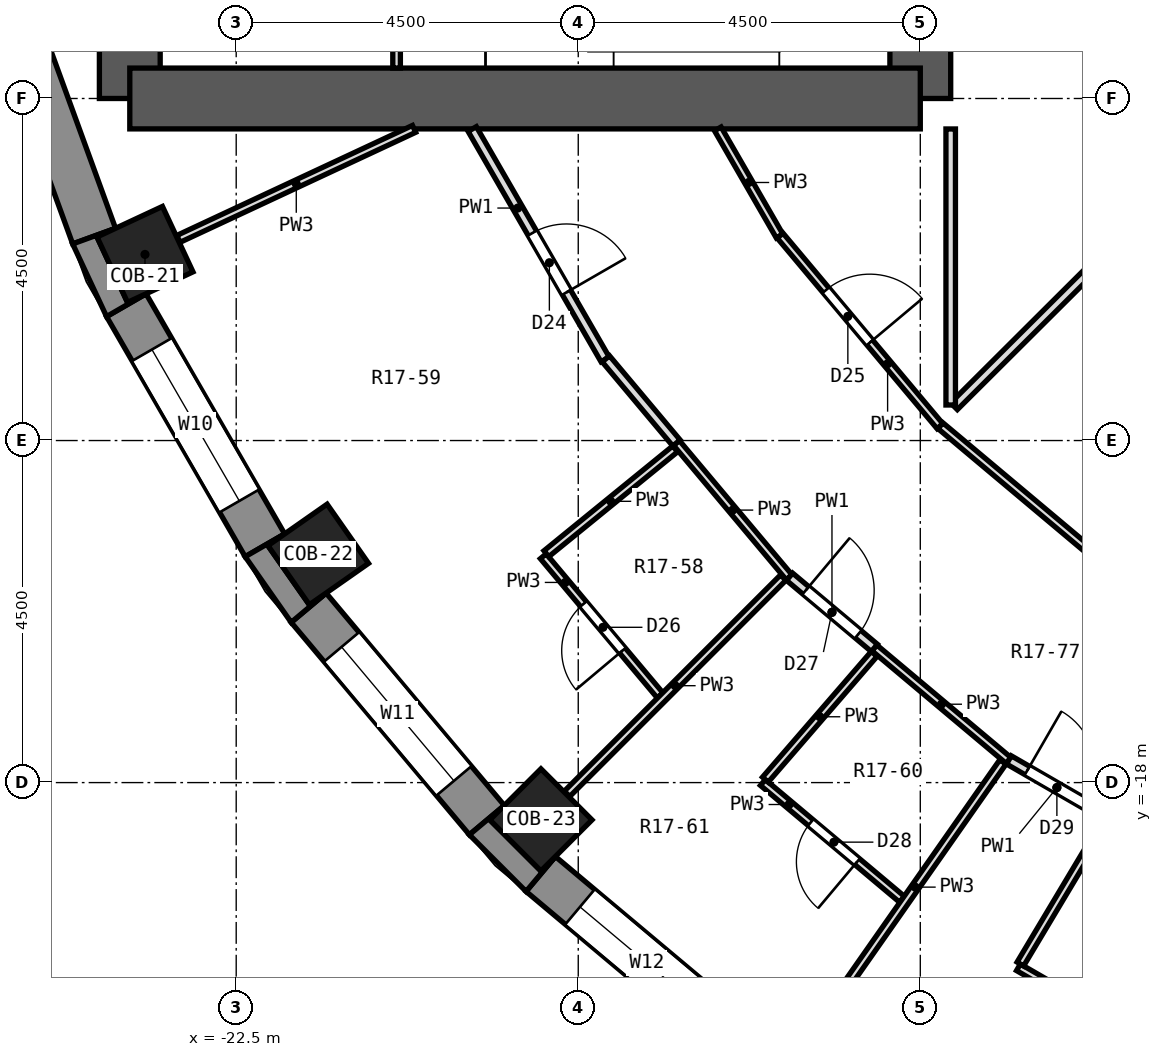
"""IFC4 building model, lengths in metres.
Left out: names, types, materials, properties, quantities, classifications, styles, units other than length and angle.
Written with IfcOpenShell. Run it as: python <this file> out.ifc"""

import sys

from ifc_helpers import new_model, si_unit, direction, frame, frame_2d, origin, origin_2d, place, context, subcontext, project, spatial, polyline, rectangle, outline, extrude, element, fill, save


model = new_model("IFC4")
c1 = context("Model", 3, precision=1e-05, world=origin(), true_north=direction((0.0, 1.0)))
c2 = subcontext(c1, "Body", "Model", "MODEL_VIEW")
j1 = project(units=[si_unit("LENGTHUNIT", "METRE"), si_unit("PLANEANGLEUNIT", "RADIAN")], contexts=[c1])
p1 = place(None, origin())
s1 = spatial("IfcSite", under=j1, at=p1, CompositionType="ELEMENT")
p2 = place(p1, origin())
s2 = spatial("IfcBuilding", under=s1, at=p2, CompositionType="ELEMENT")
p3 = place(p2, frame((0.0, 0.0, 91.9)))
s3 = spatial("IfcBuildingStorey", under=s2, at=p3, CompositionType="ELEMENT", Elevation=91.9)
for number, where, z_axis, x_axis in (
    (1, (-23.7, -11.052, 0.0), (0.0, 0.0, 1.0), (-0.906, -0.423, 0.0)),
    (2, (-21.421, -14.999, 0.0), (0.0, 0.0, 1.0), (-0.819, -0.574, 0.0)),
    (3, (-18.491, -18.491, 0.0), (0.0, 0.0, 1.0), (-0.707, -0.707, 0.0)),
):
    element("IfcColumn", number, at=place(p3, frame(where, z_axis=z_axis, x_axis=x_axis)), inside=s3, PredefinedType="COLUMN", context=c2, shape_type="SweptSolid", body=[
        extrude(rectangle(XDim=0.95, YDim=0.95, at=origin_2d()), origin(), (0.0, 0.0, 1.0), 3.3),
    ])
p4 = place(p3, frame((-13.5, -9.0, 0.0), z_axis=(0.0, 0.0, 1.0), x_axis=(0.0, 1.0, 0.0)))
e4 = element("IfcWall", 4, at=p4, inside=s3, PredefinedType="SHEAR", context=c2, shape_type="SweptSolid", body=[
    extrude(rectangle(XDim=18.0, YDim=0.8, at=frame_2d((9.0, 0.0))), origin(), (0.0, 0.0, 1.0), 3.3),
])
p5 = place(p4, frame((15.4, 0.0, 0.0)))
e5 = element("IfcOpeningElement", 5, at=p5, cuts=e4, PredefinedType="OPENING", context=c2, shape_type="SweptSolid", body=[
    extrude(rectangle(XDim=1.2, YDim=2.1, at=frame_2d((0.6, 1.05))), frame((0.0, 0.412, 0.0), z_axis=(0.0, -1.0, 0.0), x_axis=(1.0, 0.0, 0.0)), (0.0, 0.0, 1.0), 0.824),
])
p6 = place(p4, frame((1.4, 0.0, 0.0)))
e6 = element("IfcOpeningElement", 6, at=p6, cuts=e4, PredefinedType="OPENING", context=c2, shape_type="SweptSolid", body=[
    extrude(rectangle(XDim=1.2, YDim=2.1, at=frame_2d((0.6, 1.05))), frame((0.0, 0.412, 0.0), z_axis=(0.0, -1.0, 0.0), x_axis=(1.0, 0.0, 0.0)), (0.0, 0.0, 1.0), 0.824),
])
p7 = place(p4, frame((7.5, 0.0, 0.0)))
e7 = element("IfcOpeningElement", 7, at=p7, cuts=e4, PredefinedType="OPENING", context=c2, shape_type="SweptSolid", body=[
    extrude(rectangle(XDim=3.0, YDim=2.4, at=frame_2d((1.5, 1.2))), frame((0.0, 0.412, 0.0), z_axis=(0.0, -1.0, 0.0), x_axis=(1.0, 0.0, 0.0)), (0.0, 0.0, 1.0), 0.824),
])
p8 = place(p3, frame((-23.9, -9.0, 0.0), z_axis=(0.0, 0.0, 1.0), x_axis=(0.0, 1.0, 0.0)))
e8 = element("IfcWall", 8, at=p8, inside=s3, PredefinedType="SHEAR", context=c2, shape_type="SweptSolid", body=[
    extrude(rectangle(XDim=18.0, YDim=0.8, at=frame_2d((9.0, 0.0))), origin(), (0.0, 0.0, 1.0), 3.3),
])
p9 = place(p3, frame((-13.5, -9.0, 0.0), z_axis=(0.0, 0.0, 1.0), x_axis=(-1.0, 0.0, 0.0)))
e9 = element("IfcWall", 9, at=p9, inside=s3, PredefinedType="SHEAR", context=c2, shape_type="SweptSolid", body=[
    extrude(rectangle(XDim=10.4, YDim=0.8, at=frame_2d((5.2, 0.0))), origin(), (0.0, 0.0, 1.0), 3.3),
])
p10 = place(p3, frame((-25.617, -7.383, 0.0), z_axis=(0.0, 0.0, 1.0), x_axis=(0.341990236633, -0.939703505393, 0.0)))
e10 = element("IfcWall", 10, at=p10, inside=s3, PredefinedType="SOLIDWALL", context=c2, shape_type="SweptSolid", body=[
    extrude(rectangle(XDim=3.648, YDim=0.6, at=frame_2d((1.824, 0.0))), origin(), (0.0, 0.0, 1.0), 2.8),
])
p11 = place(p3, frame((-23.946, -11.719, 0.0), z_axis=(0.0, 0.0, 1.0), x_axis=(0.499954196102, -0.866051847062, 0.0)))
e11 = element("IfcWall", 11, at=p11, inside=s3, PredefinedType="SOLIDWALL", context=c2, shape_type="SweptSolid", body=[
    extrude(rectangle(XDim=3.648, YDim=0.6, at=frame_2d((1.824, 0.0))), origin(), (0.0, 0.0, 1.0), 2.8),
])
p12 = place(p11, frame((0.674, 0.0, 0.9)))
e12 = element("IfcOpeningElement", 12, at=p12, cuts=e11, PredefinedType="OPENING", context=c2, shape_type="SweptSolid", body=[
    extrude(rectangle(XDim=2.3, YDim=1.8, at=frame_2d((1.15, 0.9))), frame((0.0, 0.312, 0.0), z_axis=(0.0, -1.0, 0.0), x_axis=(1.0, 0.0, 0.0)), (0.0, 0.0, 1.0), 0.624),
])
p13 = place(p3, frame((-21.547, -15.699, 0.0), z_axis=(0.0, 0.0, 1.0), x_axis=(0.642774476932, -0.766055462616, 0.0)))
e13 = element("IfcWall", 13, at=p13, inside=s3, PredefinedType="SOLIDWALL", context=c2, shape_type="SweptSolid", body=[
    extrude(rectangle(XDim=3.648, YDim=0.6, at=frame_2d((1.824, 0.0))), origin(), (0.0, 0.0, 1.0), 2.8),
])
p14 = place(p13, frame((0.674, 0.0, 0.9)))
e14 = element("IfcOpeningElement", 14, at=p14, cuts=e13, PredefinedType="OPENING", context=c2, shape_type="SweptSolid", body=[
    extrude(rectangle(XDim=2.3, YDim=1.8, at=frame_2d((1.15, 0.9))), frame((0.0, 0.312, 0.0), z_axis=(0.0, -1.0, 0.0), x_axis=(1.0, 0.0, 0.0)), (0.0, 0.0, 1.0), 0.624),
])
p15 = place(p3, frame((-18.494, -19.202, 0.0), z_axis=(0.0, 0.0, 1.0), x_axis=(0.766055462616, -0.642774476932, 0.0)))
e15 = element("IfcWall", 15, at=p15, inside=s3, PredefinedType="SOLIDWALL", context=c2, shape_type="SweptSolid", body=[
    extrude(rectangle(XDim=3.648, YDim=0.6, at=frame_2d((1.824, 0.0))), origin(), (0.0, 0.0, 1.0), 2.8),
])
p16 = place(p15, frame((0.674, 0.0, 0.9)))
e16 = element("IfcOpeningElement", 16, at=p16, cuts=e15, PredefinedType="OPENING", context=c2, shape_type="SweptSolid", body=[
    extrude(rectangle(XDim=2.3, YDim=1.8, at=frame_2d((1.15, 0.9))), frame((0.0, 0.312, 0.0), z_axis=(0.0, -1.0, 0.0), x_axis=(1.0, 0.0, 0.0)), (0.0, 0.0, 1.0), 0.624),
])
p17 = place(p3, origin())
e17 = element("IfcWall", 17, at=p17, inside=s3, PredefinedType="SOLIDWALL", context=c2, shape_type="SweptSolid", body=[
    extrude(outline(polyline([(-24.651, -10.913), (-24.206, -11.869), (-23.686, -11.569), (-23.93, -11.683), (-24.331, -10.822), (-24.087, -10.708), (-24.651, -10.913)])), origin(), (0.0, 0.0, 1.0), 2.8),
])
p18 = place(p3, origin())
e18 = element("IfcWall", 18, at=p18, inside=s3, PredefinedType="SOLIDWALL", context=c2, shape_type="SweptSolid", body=[
    extrude(outline(polyline([(-21.777, -15.892), (-21.317, -15.506), (-21.538, -15.661), (-22.083, -14.882), (-21.862, -14.728), (-22.382, -15.028), (-21.777, -15.892)])), origin(), (0.0, 0.0, 1.0), 2.8),
])
p19 = place(p3, origin())
e19 = element("IfcWall", 19, at=p19, inside=s3, PredefinedType="SOLIDWALL", context=c2, shape_type="SweptSolid", body=[
    extrude(outline(polyline([(-19.432, -18.686), (-18.686, -19.432), (-18.301, -18.972), (-18.491, -19.163), (-19.163, -18.491), (-18.972, -18.301), (-19.432, -18.686)])), origin(), (0.0, 0.0, 1.0), 2.8),
])
p20 = place(p3, frame((-19.395, -9.402, 0.0), z_axis=(0.0, 0.0, 1.0), x_axis=(0.499726480438, -0.866183262797, 0.0)))
e20 = element("IfcWall", 20, at=p20, inside=s3, PredefinedType="PARTITIONING", context=c2, shape_type="SweptSolid", body=[
    extrude(rectangle(XDim=3.499, YDim=0.125, at=frame_2d((1.75, 0.0))), origin(), (0.0, 0.0, 1.0), 2.8),
])
p21 = place(p20, frame((1.581, 0.0, 0.0)))
e21 = element("IfcOpeningElement", 21, at=p21, cuts=e20, PredefinedType="OPENING", context=c2, shape_type="SweptSolid", body=[
    extrude(rectangle(XDim=0.9, YDim=2.1, at=frame_2d((0.45, 1.05))), frame((0.0, 0.074, 0.0), z_axis=(0.0, -1.0, 0.0), x_axis=(1.0, 0.0, 0.0)), (0.0, 0.0, 1.0), 0.149),
])
p22 = place(p3, frame((-16.164, -9.4, 0.0), z_axis=(0.0, 0.0, 1.0), x_axis=(0.499687832671, -0.866205558676, 0.0)))
e22 = element("IfcWall", 22, at=p22, inside=s3, PredefinedType="PARTITIONING", context=c2, shape_type="SweptSolid", body=[
    extrude(rectangle(XDim=1.628, YDim=0.1, at=frame_2d((0.814, 0.0))), origin(), (0.0, 0.0, 1.0), 2.8),
])
p23 = place(p3, frame((-18.46, -15.022, 0.0), z_axis=(0.0, 0.0, 1.0), x_axis=(0.642942941421, -0.765914077477, 0.0)))
e23 = element("IfcWall", 23, at=p23, inside=s3, PredefinedType="PARTITIONING", context=c2, shape_type="SweptSolid", body=[
    extrude(rectangle(XDim=2.39, YDim=0.1, at=frame_2d((1.195, 0.0))), origin(), (0.0, 0.0, 1.0), 2.8),
])
p24 = place(p23, frame((0.821, 0.0, 0.0)))
e24 = element("IfcOpeningElement", 24, at=p24, cuts=e23, PredefinedType="OPENING", context=c2, shape_type="SweptSolid", body=[
    extrude(rectangle(XDim=0.8, YDim=2.1, at=frame_2d((0.4, 1.05))), frame((0.0, 0.062, 0.0), z_axis=(0.0, -1.0, 0.0), x_axis=(1.0, 0.0, 0.0)), (0.0, 0.0, 1.0), 0.124),
])
p25 = place(p3, frame((-16.708, -13.532, 0.0), z_axis=(0.0, 0.0, 1.0), x_axis=(0.642762571273, -0.766065452145, 0.0)))
e25 = element("IfcWall", 25, at=p25, inside=s3, PredefinedType="PARTITIONING", context=c2, shape_type="SweptSolid", body=[
    extrude(rectangle(XDim=2.307, YDim=0.1, at=frame_2d((1.153, 0.0))), origin(), (0.0, 0.0, 1.0), 2.8),
])
p26 = place(p3, frame((-17.637, -12.425, 0.0), z_axis=(0.0, 0.0, 1.0), x_axis=(0.642641061866, -0.766167387458, 0.0)))
e26 = element("IfcWall", 26, at=p26, inside=s3, PredefinedType="PARTITIONING", context=c2, shape_type="SweptSolid", body=[
    extrude(rectangle(XDim=1.445, YDim=0.125, at=frame_2d((0.722, 0.0))), origin(), (0.0, 0.0, 1.0), 2.8),
])
p27 = place(p3, frame((-15.344, -10.804, 0.0), z_axis=(0.0, 0.0, 1.0), x_axis=(0.642602374159, -0.766199836025, 0.0)))
e27 = element("IfcWall", 27, at=p27, inside=s3, PredefinedType="PARTITIONING", context=c2, shape_type="SweptSolid", body=[
    extrude(rectangle(XDim=3.273, YDim=0.1, at=frame_2d((1.636, 0.0))), origin(), (0.0, 0.0, 1.0), 2.8),
])
p28 = place(p27, frame((0.936, 0.0, 0.0)))
e28 = element("IfcOpeningElement", 28, at=p28, cuts=e27, PredefinedType="OPENING", context=c2, shape_type="SweptSolid", body=[
    extrude(rectangle(XDim=0.9, YDim=2.1, at=frame_2d((0.45, 1.05))), frame((0.0, 0.062, 0.0), z_axis=(0.0, -1.0, 0.0), x_axis=(1.0, 0.0, 0.0)), (0.0, 0.0, 1.0), 0.124),
])
p29 = place(p3, frame((-15.571, -17.999, 0.0), z_axis=(0.0, 0.0, 1.0), x_axis=(0.765914077477, -0.642942941421, 0.0)))
e29 = element("IfcWall", 29, at=p29, inside=s3, PredefinedType="PARTITIONING", context=c2, shape_type="SweptSolid", body=[
    extrude(rectangle(XDim=2.39, YDim=0.1, at=frame_2d((1.195, 0.0))), origin(), (0.0, 0.0, 1.0), 2.8),
])
p30 = place(p29, frame((0.82, 0.0, 0.0)))
e30 = element("IfcOpeningElement", 30, at=p30, cuts=e29, PredefinedType="OPENING", context=c2, shape_type="SweptSolid", body=[
    extrude(rectangle(XDim=0.8, YDim=2.1, at=frame_2d((0.4, 1.05))), frame((0.0, 0.062, 0.0), z_axis=(0.0, -1.0, 0.0), x_axis=(1.0, 0.0, 0.0)), (0.0, 0.0, 1.0), 0.124),
])
p31 = place(p3, frame((-14.104, -16.228, 0.0), z_axis=(0.0, 0.0, 1.0), x_axis=(0.76604687987, -0.642784705669, 0.0)))
e31 = element("IfcWall", 31, at=p31, inside=s3, PredefinedType="PARTITIONING", context=c2, shape_type="SweptSolid", body=[
    extrude(rectangle(XDim=2.305, YDim=0.1, at=frame_2d((1.153, 0.0))), origin(), (0.0, 0.0, 1.0), 2.8),
])
p32 = place(p3, frame((-15.22, -15.292, 0.0), z_axis=(0.0, 0.0, 1.0), x_axis=(0.766114305984, -0.642704341177, 0.0)))
e32 = element("IfcWall", 32, at=p32, inside=s3, PredefinedType="PARTITIONING", context=c2, shape_type="SweptSolid", body=[
    extrude(rectangle(XDim=1.456, YDim=0.125, at=frame_2d((0.728, 0.0))), origin(), (0.0, 0.0, 1.0), 2.8),
])
p33 = place(p32, frame((0.278, 0.0, 0.0)))
e33 = element("IfcOpeningElement", 33, at=p33, cuts=e32, PredefinedType="OPENING", context=c2, shape_type="SweptSolid", body=[
    extrude(rectangle(XDim=0.9, YDim=2.1, at=frame_2d((0.45, 1.05))), frame((0.0, 0.074, 0.0), z_axis=(0.0, -1.0, 0.0), x_axis=(1.0, 0.0, 0.0)), (0.0, 0.0, 1.0), 0.149),
])
p34 = place(p3, frame((-13.235, -13.305, 0.0), z_axis=(0.0, 0.0, 1.0), x_axis=(0.766132303871, -0.642682886784, 0.0)))
e34 = element("IfcWall", 34, at=p34, inside=s3, PredefinedType="PARTITIONING", context=c2, shape_type="SweptSolid", body=[
    extrude(rectangle(XDim=3.273, YDim=0.1, at=frame_2d((1.636, 0.0))), origin(), (0.0, 0.0, 1.0), 2.8),
])
p35 = place(p3, frame((-12.209, -20.43, 0.0), z_axis=(0.0, 0.0, 1.0), x_axis=(0.865989934965, -0.500061428766, 0.0)))
e35 = element("IfcWall", 35, at=p35, inside=s3, PredefinedType="PARTITIONING", context=c2, shape_type="SweptSolid", body=[
    extrude(rectangle(XDim=2.39, YDim=0.1, at=frame_2d((1.195, 0.0))), origin(), (0.0, 0.0, 1.0), 2.8),
])
p36 = place(p35, frame((0.82, 0.0, 0.0)))
e36 = element("IfcOpeningElement", 36, at=p36, cuts=e35, PredefinedType="OPENING", context=c2, shape_type="SweptSolid", body=[
    extrude(rectangle(XDim=0.8, YDim=2.1, at=frame_2d((0.4, 1.05))), frame((0.0, 0.062, 0.0), z_axis=(0.0, -1.0, 0.0), x_axis=(1.0, 0.0, 0.0)), (0.0, 0.0, 1.0), 0.124),
])
p37 = place(p3, frame((-12.334, -17.702, 0.0), z_axis=(0.0, 0.0, 1.0), x_axis=(0.866110229381, -0.499853048967, 0.0)))
e37 = element("IfcWall", 37, at=p37, inside=s3, PredefinedType="PARTITIONING", context=c2, shape_type="SweptSolid", body=[
    extrude(rectangle(XDim=1.457, YDim=0.125, at=frame_2d((0.728, 0.0))), origin(), (0.0, 0.0, 1.0), 2.8),
])
p38 = place(p37, frame((0.278, 0.0, 0.0)))
e38 = element("IfcOpeningElement", 38, at=p38, cuts=e37, PredefinedType="OPENING", context=c2, shape_type="SweptSolid", body=[
    extrude(rectangle(XDim=0.9, YDim=2.1, at=frame_2d((0.45, 1.05))), frame((0.0, 0.074, 0.0), z_axis=(0.0, -1.0, 0.0), x_axis=(1.0, 0.0, 0.0)), (0.0, 0.0, 1.0), 0.149),
])
p39 = place(p3, frame((-23.26, -10.847, 0.0), z_axis=(0.0, 0.0, 1.0), x_axis=(0.906121146584, 0.423018282954, 0.0)))
e39 = element("IfcWall", 39, at=p39, inside=s3, PredefinedType="PARTITIONING", context=c2, shape_type="SweptSolid", body=[
    extrude(rectangle(XDim=3.421, YDim=0.1, at=frame_2d((1.711, 0.0))), origin(), (0.0, 0.0, 1.0), 2.8),
])
p40 = place(p3, frame((-18.419, -14.989, 0.0), z_axis=(0.0, 0.0, 1.0), x_axis=(0.775583643893, 0.63124481093, 0.0)))
e40 = element("IfcWall", 40, at=p40, inside=s3, PredefinedType="PARTITIONING", context=c2, shape_type="SweptSolid", body=[
    extrude(rectangle(XDim=2.184, YDim=0.1, at=frame_2d((1.092, 0.0))), origin(), (0.0, 0.0, 1.0), 2.8),
])
p41 = place(p3, frame((-13.057, -13.049, 0.0), z_axis=(0.0, 0.0, 1.0), x_axis=(0.708367099834, 0.705844212183, 0.0)))
e41 = element("IfcWall", 41, at=p41, inside=s3, PredefinedType="PARTITIONING", context=c2, shape_type="SweptSolid", body=[
    extrude(rectangle(XDim=7.354, YDim=0.125, at=frame_2d((3.677, 0.0))), origin(), (0.0, 0.0, 1.0), 2.8),
])
p42 = place(p3, frame((-18.148, -18.148, 0.0), z_axis=(0.0, 0.0, 1.0), x_axis=(0.707106781187, 0.707106781187, 0.0)))
e42 = element("IfcWall", 42, at=p42, inside=s3, PredefinedType="PARTITIONING", context=c2, shape_type="SweptSolid", body=[
    extrude(rectangle(XDim=4.023, YDim=0.1, at=frame_2d((2.011, 0.0))), origin(), (0.0, 0.0, 1.0), 2.8),
])
p43 = place(p3, frame((-15.538, -17.961, 0.0), z_axis=(0.0, 0.0, 1.0), x_axis=(0.654433202149, 0.756119821143, 0.0)))
e43 = element("IfcWall", 43, at=p43, inside=s3, PredefinedType="PARTITIONING", context=c2, shape_type="SweptSolid", body=[
    extrude(rectangle(XDim=2.187, YDim=0.1, at=frame_2d((1.094, 0.0))), origin(), (0.0, 0.0, 1.0), 2.8),
])
p44 = place(p3, frame((-14.721, -21.023, 0.0), z_axis=(0.0, 0.0, 1.0), x_axis=(0.573849206175, 0.818960981105, 0.0)))
e44 = element("IfcWall", 44, at=p44, inside=s3, PredefinedType="PARTITIONING", context=c2, shape_type="SweptSolid", body=[
    extrude(rectangle(XDim=4.023, YDim=0.1, at=frame_2d((2.011, 0.0))), origin(), (0.0, 0.0, 1.0), 2.8),
])
p45 = place(p3, frame((-12.183, -20.387, 0.0), z_axis=(0.0, 0.0, 1.0), x_axis=(0.512903306279, 0.85844638645, 0.0)))
e45 = element("IfcWall", 45, at=p45, inside=s3, PredefinedType="PARTITIONING", context=c2, shape_type="SweptSolid", body=[
    extrude(rectangle(XDim=2.188, YDim=0.1, at=frame_2d((1.094, 0.0))), origin(), (0.0, 0.0, 1.0), 2.8),
])
p46 = place(p3, frame((-13.1, -13.032, 0.0), z_axis=(0.0, 0.0, 1.0), x_axis=(0.0, 1.0, 0.0)))
e46 = element("IfcWall", 46, at=p46, inside=s3, PredefinedType="PARTITIONING", context=c2, shape_type="SweptSolid", body=[
    extrude(rectangle(XDim=3.632, YDim=0.125, at=frame_2d((1.816, 0.0))), origin(), (0.0, 0.0, 1.0), 2.8),
])
p47 = place(p3, frame((-20.39, -8.6, 0.0), z_axis=(0.0, 0.0, 1.0), x_axis=(0.0, 1.0, 0.0)))
e47 = element("IfcWall", 47, at=p47, inside=s3, PredefinedType="PARTITIONING", context=c2, shape_type="SweptSolid", body=[
    extrude(rectangle(XDim=3.35, YDim=0.1, at=frame_2d((1.675, 0.0))), origin(), (0.0, 0.0, 1.0), 2.8),
])
p48 = place(p12, origin())
e48 = element("IfcWindow", 48, at=p48, inside=s3, PartitioningType="SINGLE_PANEL", PredefinedType="WINDOW", context=c2, shape_type="SweptSolid", body=[
    extrude(rectangle(XDim=2.3, YDim=1.8, at=frame_2d((1.15, 0.9))), frame((0.0, 0.18, 0.0), z_axis=(0.0, -1.0, 0.0), x_axis=(1.0, 0.0, 0.0)), (0.0, 0.0, 1.0), 0.06),
])
fill(e12, e48)
p49 = place(p14, origin())
e49 = element("IfcWindow", 49, at=p49, inside=s3, PartitioningType="SINGLE_PANEL", PredefinedType="WINDOW", context=c2, shape_type="SweptSolid", body=[
    extrude(rectangle(XDim=2.3, YDim=1.8, at=frame_2d((1.15, 0.9))), frame((0.0, 0.18, 0.0), z_axis=(0.0, -1.0, 0.0), x_axis=(1.0, 0.0, 0.0)), (0.0, 0.0, 1.0), 0.06),
])
fill(e14, e49)
p50 = place(p16, origin())
e50 = element("IfcWindow", 50, at=p50, inside=s3, PartitioningType="SINGLE_PANEL", PredefinedType="WINDOW", context=c2, shape_type="SweptSolid", body=[
    extrude(rectangle(XDim=2.3, YDim=1.8, at=frame_2d((1.15, 0.9))), frame((0.0, 0.18, 0.0), z_axis=(0.0, -1.0, 0.0), x_axis=(1.0, 0.0, 0.0)), (0.0, 0.0, 1.0), 0.06),
])
fill(e16, e50)
p51 = place(p21, origin())
e51 = element("IfcDoor", 51, at=p51, inside=s3, OperationType="SINGLE_SWING_RIGHT", PredefinedType="DOOR", context=c2, shape_type="SweptSolid", body=[
    extrude(rectangle(XDim=0.9, YDim=2.1, at=frame_2d((0.45, 1.05))), frame((0.0, 0.025, 0.0), z_axis=(0.0, -1.0, 0.0), x_axis=(1.0, 0.0, 0.0)), (0.0, 0.0, 1.0), 0.05),
])
fill(e21, e51)
p52 = place(p28, origin())
e52 = element("IfcDoor", 52, at=p52, inside=s3, OperationType="SINGLE_SWING_RIGHT", PredefinedType="DOOR", context=c2, shape_type="SweptSolid", body=[
    extrude(rectangle(XDim=0.9, YDim=2.1, at=frame_2d((0.45, 1.05))), frame((0.0, 0.025, 0.0), z_axis=(0.0, -1.0, 0.0), x_axis=(1.0, 0.0, 0.0)), (0.0, 0.0, 1.0), 0.05),
])
fill(e28, e52)
p53 = place(p24, frame((0.8, 0.0, 0.0), z_axis=(0.0, 0.0, 1.0), x_axis=(-1.0, 0.0, 0.0)))
e53 = element("IfcDoor", 53, at=p53, inside=s3, OperationType="SINGLE_SWING_LEFT", PredefinedType="DOOR", context=c2, shape_type="SweptSolid", body=[
    extrude(rectangle(XDim=0.8, YDim=2.1, at=frame_2d((0.4, 1.05))), frame((0.0, 0.025, 0.0), z_axis=(0.0, -1.0, 0.0), x_axis=(1.0, 0.0, 0.0)), (0.0, 0.0, 1.0), 0.05),
])
fill(e24, e53)
p54 = place(p33, origin())
e54 = element("IfcDoor", 54, at=p54, inside=s3, OperationType="SINGLE_SWING_LEFT", PredefinedType="DOOR", context=c2, shape_type="SweptSolid", body=[
    extrude(rectangle(XDim=0.9, YDim=2.1, at=frame_2d((0.45, 1.05))), frame((0.0, 0.025, 0.0), z_axis=(0.0, -1.0, 0.0), x_axis=(1.0, 0.0, 0.0)), (0.0, 0.0, 1.0), 0.05),
])
fill(e33, e54)
p55 = place(p30, frame((0.8, 0.0, 0.0), z_axis=(0.0, 0.0, 1.0), x_axis=(-1.0, 0.0, 0.0)))
e55 = element("IfcDoor", 55, at=p55, inside=s3, OperationType="SINGLE_SWING_LEFT", PredefinedType="DOOR", context=c2, shape_type="SweptSolid", body=[
    extrude(rectangle(XDim=0.8, YDim=2.1, at=frame_2d((0.4, 1.05))), frame((0.0, 0.025, 0.0), z_axis=(0.0, -1.0, 0.0), x_axis=(1.0, 0.0, 0.0)), (0.0, 0.0, 1.0), 0.05),
])
fill(e30, e55)
p56 = place(p38, origin())
e56 = element("IfcDoor", 56, at=p56, inside=s3, OperationType="SINGLE_SWING_LEFT", PredefinedType="DOOR", context=c2, shape_type="SweptSolid", body=[
    extrude(rectangle(XDim=0.9, YDim=2.1, at=frame_2d((0.45, 1.05))), frame((0.0, 0.025, 0.0), z_axis=(0.0, -1.0, 0.0), x_axis=(1.0, 0.0, 0.0)), (0.0, 0.0, 1.0), 0.05),
])
fill(e38, e56)
save(model, sys.argv[1])
